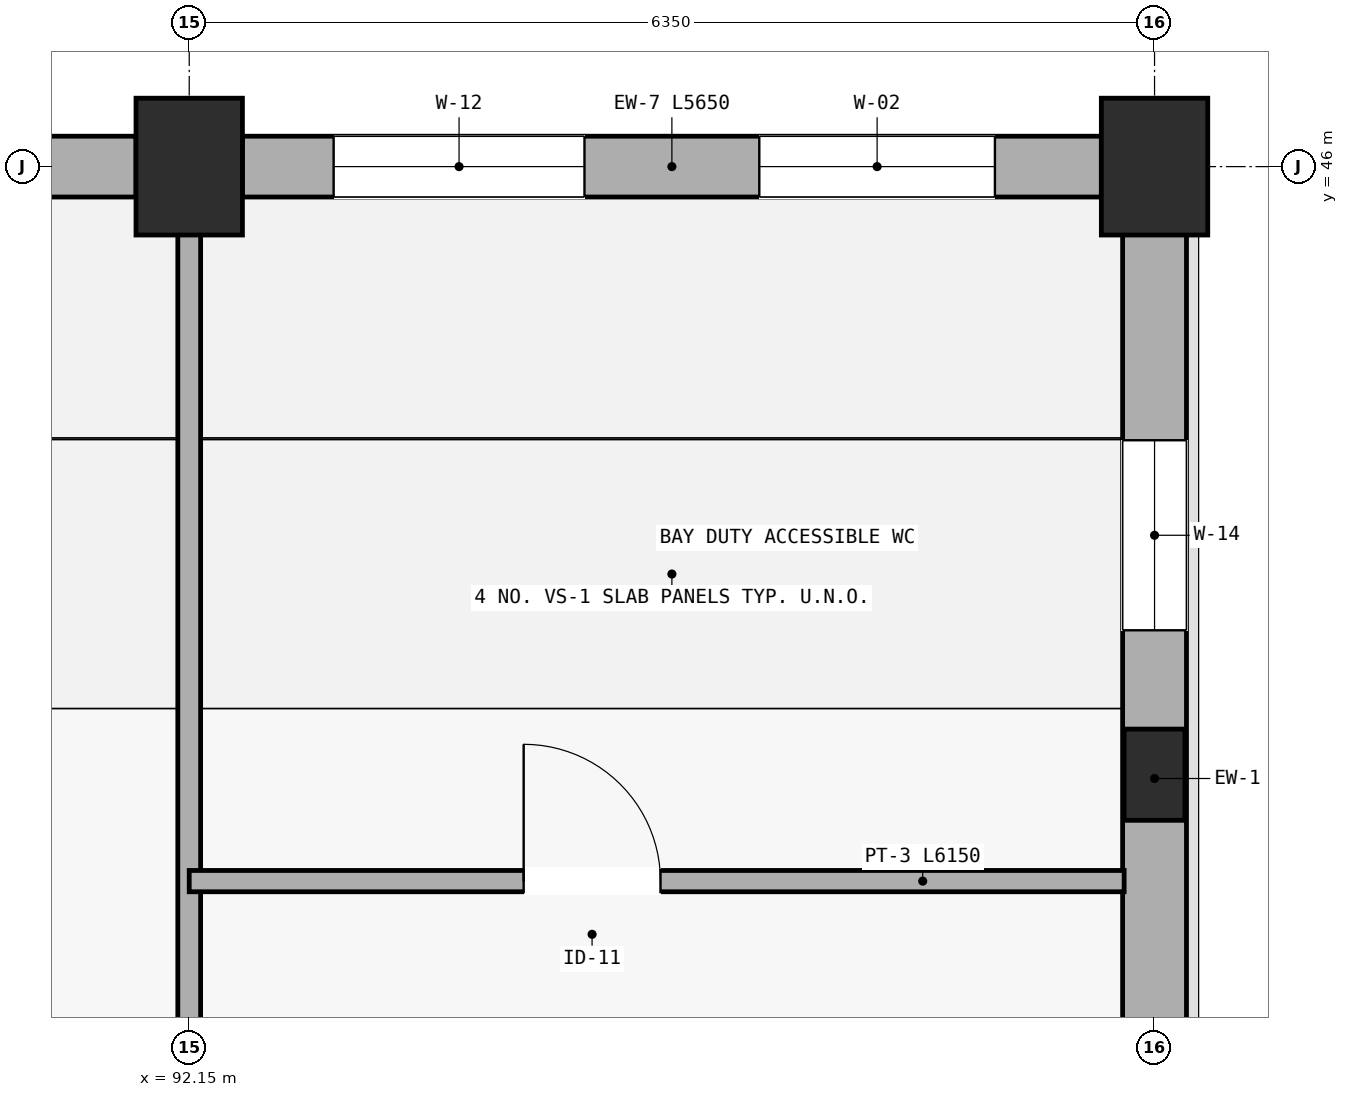
"""IFC4 building model, lengths in metres.
Left out: names, types, materials, properties, quantities, classifications, styles, units other than length and angle.
Written with IfcOpenShell. Run it as: python <this file> out.ifc"""

import sys

from ifc_helpers import new_model, si_unit, direction, frame, frame_2d, origin, origin_2d, place, context, subcontext, project, spatial, rectangle, extrude, element, fill, save


model = new_model("IFC4")
c1 = context("Model", 3, precision=1e-05, world=origin(), true_north=direction((0.0, 1.0)))
c2 = subcontext(c1, "Body", "Model", "MODEL_VIEW")
j1 = project(units=[si_unit("LENGTHUNIT", "METRE"), si_unit("PLANEANGLEUNIT", "RADIAN")], contexts=[c1])
p1 = place(None, origin())
s1 = spatial("IfcSite", under=j1, at=p1, CompositionType="ELEMENT")
p2 = place(p1, origin())
s2 = spatial("IfcBuilding", under=s1, at=p2, CompositionType="ELEMENT")
p3 = place(p2, origin())
s3 = spatial("IfcBuildingStorey", under=s2, at=p3, CompositionType="ELEMENT", Elevation=0.0)
for number, where, z_axis, x_axis in (
    (1, (92.15, 46.0, 0.0), (0.0, 0.0, 1.0), (1.0, 0.0, 0.0)),
    (2, (98.5, 46.0, 0.0), (0.0, 0.0, 1.0), (1.0, 0.0, 0.0)),
):
    element("IfcColumn", number, at=place(p3, frame(where, z_axis=z_axis, x_axis=x_axis)), inside=s3, PredefinedType="COLUMN", context=c2, shape_type="SweptSolid", body=[
        extrude(rectangle(XDim=0.7, YDim=0.9, at=origin_2d()), origin(), (0.0, 0.0, 1.0), 5.65),
    ])
p4 = place(p3, frame((98.5, 42.0, 0.0), z_axis=(0.0, 0.0, 1.0), x_axis=(1.0, 0.0, 0.0)))
e3 = element("IfcColumn", 3, at=p4, inside=s3, PredefinedType="PILASTER", context=c2, shape_type="SweptSolid", body=[
    extrude(rectangle(XDim=0.4, YDim=0.6, at=origin_2d()), origin(), (0.0, 0.0, 1.0), 5.85),
])
p5 = place(p3, frame((91.8, 46.0, 0.0), z_axis=(0.0, 0.0, 1.0), x_axis=(-1.0, 0.0, 0.0)))
e4 = element("IfcWall", 4, at=p5, inside=s3, PredefinedType="STANDARD", context=c2, shape_type="SweptSolid", body=[
    extrude(rectangle(XDim=5.65, YDim=0.4, at=frame_2d((2.825, 0.0))), origin(), (0.0, 0.0, 1.0), 3.8),
])
p6 = place(p5, frame((0.7, 0.0, 0.95)))
e5 = element("IfcOpeningElement", 5, at=p6, cuts=e4, PredefinedType="OPENING", context=c2, shape_type="SweptSolid", body=[
    extrude(rectangle(XDim=1.55, YDim=1.55, at=frame_2d((0.775, 0.775))), frame((0.0, 0.21, 0.0), z_axis=(0.0, -1.0, 0.0), x_axis=(1.0, 0.0, 0.0)), (0.0, 0.0, 1.0), 0.42),
])
p7 = place(p5, frame((3.4, 0.0, 0.95)))
e6 = element("IfcOpeningElement", 6, at=p7, cuts=e4, PredefinedType="OPENING", context=c2, shape_type="SweptSolid", body=[
    extrude(rectangle(XDim=1.65, YDim=1.45, at=frame_2d((0.825, 0.725))), frame((0.0, 0.21, 0.0), z_axis=(0.0, -1.0, 0.0), x_axis=(1.0, 0.0, 0.0)), (0.0, 0.0, 1.0), 0.42),
])
p8 = place(p3, frame((98.15, 46.0, 0.0), z_axis=(0.0, 0.0, 1.0), x_axis=(-1.0, 0.0, 0.0)))
e7 = element("IfcWall", 7, at=p8, inside=s3, PredefinedType="STANDARD", context=c2, shape_type="SweptSolid", body=[
    extrude(rectangle(XDim=5.65, YDim=0.4, at=frame_2d((2.825, 0.0))), origin(), (0.0, 0.0, 1.0), 3.8),
])
p9 = place(p8, frame((0.7, 0.0, 0.95)))
e8 = element("IfcOpeningElement", 8, at=p9, cuts=e7, PredefinedType="OPENING", context=c2, shape_type="SweptSolid", body=[
    extrude(rectangle(XDim=1.55, YDim=1.55, at=frame_2d((0.775, 0.775))), frame((0.0, 0.21, 0.0), z_axis=(0.0, -1.0, 0.0), x_axis=(1.0, 0.0, 0.0)), (0.0, 0.0, 1.0), 0.42),
])
p10 = place(p8, frame((3.4, 0.0, 0.95)))
e9 = element("IfcOpeningElement", 9, at=p10, cuts=e7, PredefinedType="OPENING", context=c2, shape_type="SweptSolid", body=[
    extrude(rectangle(XDim=1.65, YDim=1.45, at=frame_2d((0.825, 0.725))), frame((0.0, 0.21, 0.0), z_axis=(0.0, -1.0, 0.0), x_axis=(1.0, 0.0, 0.0)), (0.0, 0.0, 1.0), 0.42),
])
p11 = place(p3, frame((98.5, 38.35, 0.0), z_axis=(0.0, 0.0, 1.0), x_axis=(0.0, 1.0, 0.0)))
e10 = element("IfcWall", 10, at=p11, inside=s3, PredefinedType="STANDARD", context=c2, shape_type="SweptSolid", body=[
    extrude(rectangle(XDim=7.25, YDim=0.42, at=frame_2d((3.625, 0.0))), origin(), (0.0, 0.0, 1.0), 3.928),
])
p12 = place(p11, frame((0.7, 0.0, 1.05)))
e11 = element("IfcOpeningElement", 11, at=p12, cuts=e10, PredefinedType="OPENING", context=c2, shape_type="SweptSolid", body=[
    extrude(rectangle(XDim=1.15, YDim=1.45, at=frame_2d((0.575, 0.725))), frame((0.0, 0.22, 0.0), z_axis=(0.0, -1.0, 0.0), x_axis=(1.0, 0.0, 0.0)), (0.0, 0.0, 1.0), 0.44),
])
p13 = place(p11, frame((4.6, 0.0, 1.05)))
e12 = element("IfcOpeningElement", 12, at=p13, cuts=e10, PredefinedType="OPENING", context=c2, shape_type="SweptSolid", body=[
    extrude(rectangle(XDim=1.25, YDim=1.5, at=frame_2d((0.625, 0.75))), frame((0.0, 0.22, 0.0), z_axis=(0.0, -1.0, 0.0), x_axis=(1.0, 0.0, 0.0)), (0.0, 0.0, 1.0), 0.44),
])
p14 = place(p3, frame((92.15, 32.95, 0.0), z_axis=(0.0, 0.0, 1.0), x_axis=(0.0, 1.0, 0.0)))
e13 = element("IfcWall", 13, at=p14, inside=s3, PredefinedType="PARTITIONING", context=c2, shape_type="SweptSolid", body=[
    extrude(rectangle(XDim=12.85, YDim=0.15, at=frame_2d((6.425, 0.0))), origin(), (0.0, 0.0, 1.0), 3.928),
])
p15 = place(p3, frame((92.15, 41.3, 0.0), z_axis=(0.0, 0.0, 1.0), x_axis=(1.0, 0.0, 0.0)))
e14 = element("IfcWall", 14, at=p15, inside=s3, PredefinedType="PARTITIONING", context=c2, shape_type="SweptSolid", body=[
    extrude(rectangle(XDim=6.15, YDim=0.14, at=frame_2d((3.075, 0.0))), origin(), (0.0, 0.0, 1.0), 4.4),
])
p16 = place(p15, frame((2.2, 0.0, 0.0)))
e15 = element("IfcOpeningElement", 15, at=p16, cuts=e14, PredefinedType="OPENING", context=c2, shape_type="SweptSolid", body=[
    extrude(rectangle(XDim=0.9, YDim=2.08, at=frame_2d((0.45, 1.04))), frame((0.0, 0.08, 0.0), z_axis=(0.0, -1.0, 0.0), x_axis=(1.0, 0.0, 0.0)), (0.0, 0.0, 1.0), 0.16),
])
p17 = place(p9, origin())
e16 = element("IfcWindow", 16, at=p17, inside=s3, PartitioningType="DOUBLE_PANEL_VERTICAL", PredefinedType="WINDOW", context=c2, shape_type="SweptSolid", body=[
    extrude(rectangle(XDim=1.55, YDim=1.55, at=frame_2d((0.775, 0.775))), frame((0.0, 0.03, 0.0), z_axis=(0.0, -1.0, 0.0), x_axis=(1.0, 0.0, 0.0)), (0.0, 0.0, 1.0), 0.06),
])
fill(e8, e16)
p18 = place(p10, origin())
e17 = element("IfcWindow", 17, at=p18, inside=s3, PartitioningType="DOUBLE_PANEL_VERTICAL", PredefinedType="WINDOW", context=c2, shape_type="SweptSolid", body=[
    extrude(rectangle(XDim=1.65, YDim=1.45, at=frame_2d((0.825, 0.725))), frame((0.0, 0.03, 0.0), z_axis=(0.0, -1.0, 0.0), x_axis=(1.0, 0.0, 0.0)), (0.0, 0.0, 1.0), 0.06),
])
fill(e9, e17)
p19 = place(p13, origin())
e18 = element("IfcWindow", 18, at=p19, inside=s3, PartitioningType="SINGLE_PANEL", PredefinedType="WINDOW", context=c2, shape_type="SweptSolid", body=[
    extrude(rectangle(XDim=1.25, YDim=1.5, at=frame_2d((0.625, 0.75))), frame((0.0, 0.03, 0.0), z_axis=(0.0, -1.0, 0.0), x_axis=(1.0, 0.0, 0.0)), (0.0, 0.0, 1.0), 0.06),
])
fill(e12, e18)
p20 = place(p16, origin())
e19 = element("IfcDoor", 19, at=p20, inside=s3, OperationType="SINGLE_SWING_LEFT", PredefinedType="DOOR", context=c2, shape_type="SweptSolid", body=[
    extrude(rectangle(XDim=0.9, YDim=2.08, at=frame_2d((0.45, 1.04))), frame((0.0, 0.025, 0.0), z_axis=(0.0, -1.0, 0.0), x_axis=(1.0, 0.0, 0.0)), (0.0, 0.0, 1.0), 0.05),
])
fill(e15, e19)
save(model, sys.argv[1])
